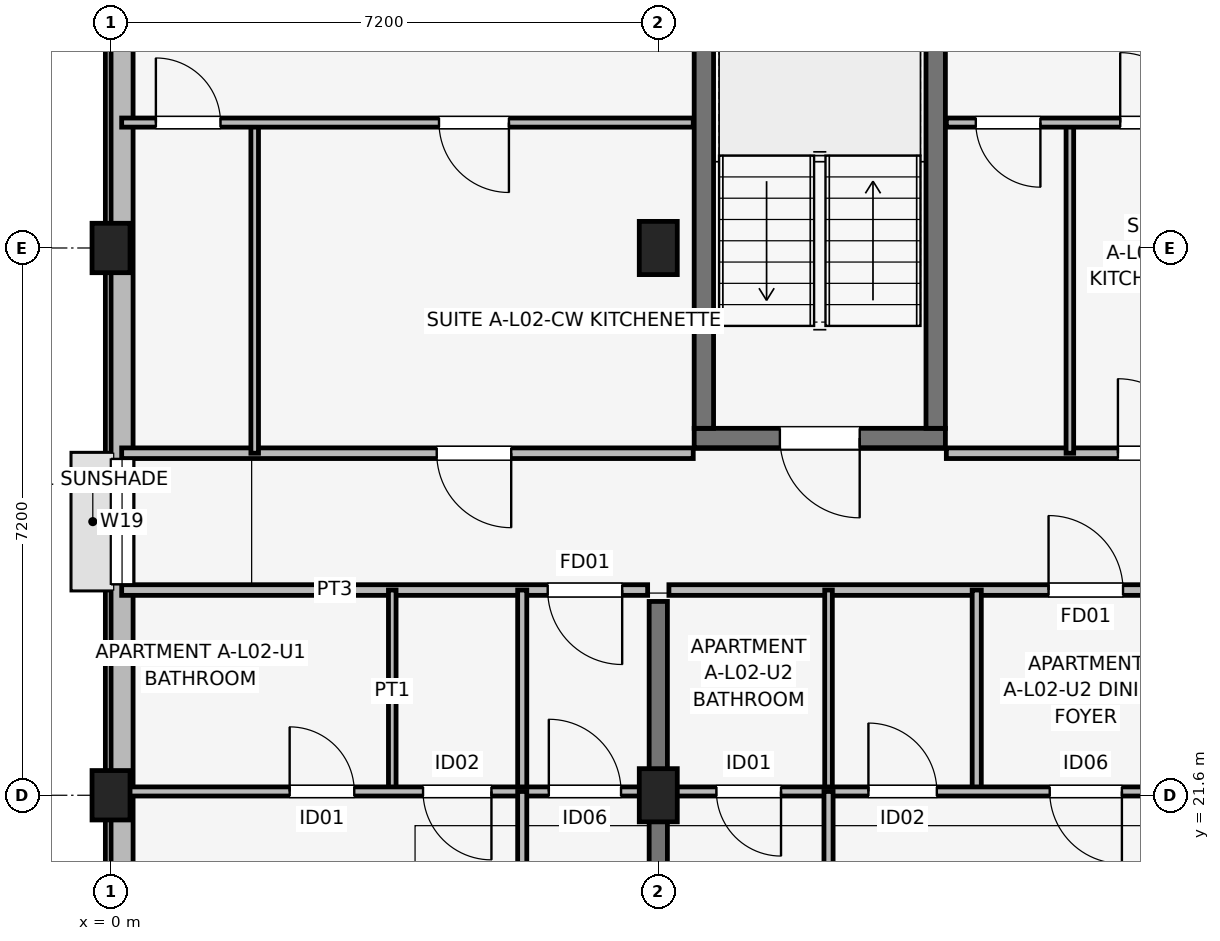
"""IFC4 building model, lengths in metres.
Left out: names, types, materials, properties, quantities, classifications, styles, units other than length and angle.
Written with IfcOpenShell. Run it as: python <this file> out.ifc"""

import sys

from ifc_helpers import new_model, si_unit, direction, frame, frame_2d, origin, origin_2d, place, context, subcontext, project, spatial, rectangle, extrude, element, fill, save


model = new_model("IFC4")
c1 = context("Model", 3, precision=1e-05, world=origin(), true_north=direction((0.0, 1.0)))
c2 = subcontext(c1, "Body", "Model", "MODEL_VIEW")
j1 = project(units=[si_unit("LENGTHUNIT", "METRE"), si_unit("PLANEANGLEUNIT", "RADIAN")], contexts=[c1])
p1 = place(None, origin())
s1 = spatial("IfcSite", under=j1, at=p1, CompositionType="ELEMENT")
p2 = place(p1, origin())
s2 = spatial("IfcBuilding", under=s1, at=p2, CompositionType="ELEMENT")
p3 = place(p2, frame((0.0, 0.0, 8.7)))
s3 = spatial("IfcBuildingStorey", under=s2, at=p3, CompositionType="ELEMENT", Elevation=8.7)
for number, where, z_axis, x_axis in (
    (1, (0.0, 21.6, 0.0), (0.0, 0.0, 1.0), (1.0, 0.0, 0.0)),
    (2, (0.0, 28.8, 0.0), (0.0, 0.0, 1.0), (1.0, 0.0, 0.0)),
):
    element("IfcColumn", number, at=place(p3, frame(where, z_axis=z_axis, x_axis=x_axis)), inside=s3, PredefinedType="COLUMN", context=c2, shape_type="SweptSolid", body=[
        extrude(rectangle(XDim=0.5, YDim=0.65, at=origin_2d()), origin(), (0.0, 0.0, 1.0), 3.15),
    ])
for number, where, z_axis, x_axis in (
    (3, (7.2, 21.6, 0.0), (0.0, 0.0, 1.0), (1.0, 0.0, 0.0)),
    (4, (7.2, 28.8, 0.0), (0.0, 0.0, 1.0), (1.0, 0.0, 0.0)),
):
    element("IfcColumn", number, at=place(p3, frame(where, z_axis=z_axis, x_axis=x_axis)), inside=s3, PredefinedType="COLUMN", context=c2, shape_type="SweptSolid", body=[
        extrude(rectangle(XDim=0.5, YDim=0.7, at=origin_2d()), origin(), (0.0, 0.0, 1.0), 3.15),
    ])
p4 = place(p3, frame((7.673, 26.3, 0.0), z_axis=(0.0, 0.0, 1.0), x_axis=(1.0, 0.0, 0.0)))
e5 = element("IfcWall", 5, at=p4, inside=s3, PredefinedType="SHEAR", context=c2, shape_type="SweptSolid", body=[
    extrude(rectangle(XDim=3.305, YDim=0.255, at=frame_2d((1.652, 0.0))), origin(), (0.0, 0.0, 1.0), 3.15),
])
p5 = place(p4, frame((2.177, 0.0, 0.0), z_axis=(0.0, 0.0, 1.0), x_axis=(-1.0, 0.0, 0.0)))
e6 = element("IfcOpeningElement", 6, at=p5, cuts=e5, PredefinedType="OPENING", context=c2, shape_type="SweptSolid", body=[
    extrude(rectangle(XDim=1.05, YDim=2.12, at=frame_2d((0.525, 1.06))), frame((0.0, 0.137, 0.0), z_axis=(0.0, -1.0, 0.0), x_axis=(1.0, 0.0, 0.0)), (0.0, 0.0, 1.0), 0.275),
])
for number, where, z_axis, x_axis in (
    (7, (7.8, 26.427, 0.0), (0.0, 0.0, 1.0), (0.0, 1.0, 0.0)),
    (8, (10.85, 26.427, 0.0), (0.0, 0.0, 1.0), (0.0, 1.0, 0.0)),
):
    element("IfcWall", number, at=place(p3, frame(where, z_axis=z_axis, x_axis=x_axis)), inside=s3, PredefinedType="SHEAR", context=c2, shape_type="SweptSolid", body=[
        extrude(rectangle(XDim=6.295, YDim=0.255, at=frame_2d((3.147, 0.0))), origin(), (0.0, 0.0, 1.0), 3.15),
    ])
p6 = place(p3, frame((7.2, 14.75, 0.0), z_axis=(0.0, 0.0, 1.0), x_axis=(0.0, 1.0, 0.0)))
e9 = element("IfcWall", 9, at=p6, inside=s3, PredefinedType="SHEAR", context=c2, shape_type="SweptSolid", body=[
    extrude(rectangle(XDim=9.4, YDim=0.24, at=frame_2d((4.7, 0.0))), origin(), (0.0, 0.0, 1.0), 3.15),
])
p7 = place(p3, frame((0.145, 32.6, 0.0), z_axis=(0.0, 0.0, 1.0), x_axis=(0.0, -1.0, 0.0)))
e10 = element("IfcWall", 10, at=p7, inside=s3, PredefinedType="SOLIDWALL", context=c2, shape_type="SweptSolid", body=[
    extrude(rectangle(XDim=14.8, YDim=0.29, at=frame_2d((7.4, 0.0))), origin(), (0.0, 0.0, 1.0), 2.38),
])
p8 = place(p7, frame((6.575, 0.0, 1.05)))
e11 = element("IfcOpeningElement", 11, at=p8, cuts=e10, PredefinedType="OPENING", context=c2, shape_type="SweptSolid", body=[
    extrude(rectangle(XDim=1.65, YDim=1.15, at=frame_2d((0.825, 0.575))), frame((0.0, 0.155, 0.0), z_axis=(0.0, -1.0, 0.0), x_axis=(1.0, 0.0, 0.0)), (0.0, 0.0, 1.0), 0.31),
])
p9 = place(p7, frame((12.327, 0.0, 0.72)))
e12 = element("IfcOpeningElement", 12, at=p9, cuts=e10, PredefinedType="OPENING", context=c2, shape_type="SweptSolid", body=[
    extrude(rectangle(XDim=1.3, YDim=1.55, at=frame_2d((0.65, 0.775))), frame((0.0, 0.155, 0.0), z_axis=(0.0, -1.0, 0.0), x_axis=(1.0, 0.0, 0.0)), (0.0, 0.0, 1.0), 0.31),
])
p10 = place(p3, frame((0.14, 24.3, 0.0), z_axis=(0.0, 0.0, 1.0), x_axis=(1.0, 0.0, 0.0)))
e13 = element("IfcWall", 13, at=p10, inside=s3, PredefinedType="PARTITIONING", context=c2, shape_type="SweptSolid", body=[
    extrude(rectangle(XDim=6.92, YDim=0.14, at=frame_2d((3.46, 0.0))), origin(), (0.0, 0.0, 1.0), 2.38),
])
p11 = place(p10, frame((6.585, 0.0, 0.0), z_axis=(0.0, 0.0, 1.0), x_axis=(-1.0, 0.0, 0.0)))
e14 = element("IfcOpeningElement", 14, at=p11, cuts=e13, PredefinedType="OPENING", context=c2, shape_type="SweptSolid", body=[
    extrude(rectangle(XDim=0.98, YDim=2.1, at=frame_2d((0.49, 1.05))), frame((0.0, 0.08, 0.0), z_axis=(0.0, -1.0, 0.0), x_axis=(1.0, 0.0, 0.0)), (0.0, 0.0, 1.0), 0.16),
])
p12 = place(p3, frame((3.7, 21.65, 0.0), z_axis=(0.0, 0.0, 1.0), x_axis=(0.0, 1.0, 0.0)))
e15 = element("IfcWall", 15, at=p12, inside=s3, PredefinedType="PARTITIONING", context=c2, shape_type="SweptSolid", body=[
    extrude(rectangle(XDim=2.65, YDim=0.1, at=frame_2d((1.325, 0.0))), origin(), (0.0, 0.0, 1.0), 2.375),
])
p13 = place(p3, frame((5.41, 21.65, 0.0), z_axis=(0.0, 0.0, 1.0), x_axis=(0.0, 1.0, 0.0)))
e16 = element("IfcWall", 16, at=p13, inside=s3, PredefinedType="PARTITIONING", context=c2, shape_type="SweptSolid", body=[
    extrude(rectangle(XDim=2.65, YDim=0.12, at=frame_2d((1.325, 0.0))), origin(), (0.0, 0.0, 1.0), 2.375),
])
p14 = place(p3, frame((0.14, 21.65, 0.0), z_axis=(0.0, 0.0, 1.0), x_axis=(1.0, 0.0, 0.0)))
e17 = element("IfcWall", 17, at=p14, inside=s3, PredefinedType="PARTITIONING", context=c2, shape_type="SweptSolid", body=[
    extrude(rectangle(XDim=6.92, YDim=0.12, at=frame_2d((3.46, 0.0))), origin(), (0.0, 0.0, 1.0), 2.375),
])
p15 = place(p14, frame((2.21, 0.0, 0.0)))
e18 = element("IfcOpeningElement", 18, at=p15, cuts=e17, PredefinedType="OPENING", context=c2, shape_type="SweptSolid", body=[
    extrude(rectangle(XDim=0.85, YDim=2.08, at=frame_2d((0.425, 1.04))), frame((0.0, 0.07, 0.0), z_axis=(0.0, -1.0, 0.0), x_axis=(1.0, 0.0, 0.0)), (0.0, 0.0, 1.0), 0.14),
])
p16 = place(p14, frame((4.865, 0.0, 0.0), z_axis=(0.0, 0.0, 1.0), x_axis=(-1.0, 0.0, 0.0)))
e19 = element("IfcOpeningElement", 19, at=p16, cuts=e17, PredefinedType="OPENING", context=c2, shape_type="SweptSolid", body=[
    extrude(rectangle(XDim=0.9, YDim=2.08, at=frame_2d((0.45, 1.04))), frame((0.0, 0.07, 0.0), z_axis=(0.0, -1.0, 0.0), x_axis=(1.0, 0.0, 0.0)), (0.0, 0.0, 1.0), 0.14),
])
p17 = place(p14, frame((5.62, 0.0, 0.0)))
e20 = element("IfcOpeningElement", 20, at=p17, cuts=e17, PredefinedType="OPENING", context=c2, shape_type="SweptSolid", body=[
    extrude(rectangle(XDim=0.95, YDim=2.08, at=frame_2d((0.475, 1.04))), frame((0.0, 0.07, 0.0), z_axis=(0.0, -1.0, 0.0), x_axis=(1.0, 0.0, 0.0)), (0.0, 0.0, 1.0), 0.14),
])
p18 = place(p3, frame((5.41, 14.7, 0.0), z_axis=(0.0, 0.0, 1.0), x_axis=(0.0, 1.0, 0.0)))
e21 = element("IfcWall", 21, at=p18, inside=s3, PredefinedType="PARTITIONING", context=c2, shape_type="SweptSolid", body=[
    extrude(rectangle(XDim=6.95, YDim=0.12, at=frame_2d((3.475, 0.0))), origin(), (0.0, 0.0, 1.0), 2.375),
])
p19 = place(p18, frame((3.925, 0.0, 0.0), z_axis=(0.0, 0.0, 1.0), x_axis=(-1.0, 0.0, 0.0)))
e22 = element("IfcOpeningElement", 22, at=p19, cuts=e21, PredefinedType="OPENING", context=c2, shape_type="SweptSolid", body=[
    extrude(rectangle(XDim=0.9, YDim=2.08, at=frame_2d((0.45, 1.04))), frame((0.0, 0.07, 0.0), z_axis=(0.0, -1.0, 0.0), x_axis=(1.0, 0.0, 0.0)), (0.0, 0.0, 1.0), 0.14),
])
p20 = place(p3, frame((7.34, 24.3, 0.0), z_axis=(0.0, 0.0, 1.0), x_axis=(1.0, 0.0, 0.0)))
e23 = element("IfcWall", 23, at=p20, inside=s3, PredefinedType="PARTITIONING", context=c2, shape_type="SweptSolid", body=[
    extrude(rectangle(XDim=6.92, YDim=0.14, at=frame_2d((3.46, 0.0))), origin(), (0.0, 0.0, 1.0), 2.38),
])
p21 = place(p20, frame((4.995, 0.0, 0.0)))
e24 = element("IfcOpeningElement", 24, at=p21, cuts=e23, PredefinedType="OPENING", context=c2, shape_type="SweptSolid", body=[
    extrude(rectangle(XDim=0.98, YDim=2.1, at=frame_2d((0.49, 1.05))), frame((0.0, 0.08, 0.0), z_axis=(0.0, -1.0, 0.0), x_axis=(1.0, 0.0, 0.0)), (0.0, 0.0, 1.0), 0.16),
])
p22 = place(p3, frame((9.44, 21.65, 0.0), z_axis=(0.0, 0.0, 1.0), x_axis=(0.0, 1.0, 0.0)))
e25 = element("IfcWall", 25, at=p22, inside=s3, PredefinedType="PARTITIONING", context=c2, shape_type="SweptSolid", body=[
    extrude(rectangle(XDim=2.65, YDim=0.1, at=frame_2d((1.325, 0.0))), origin(), (0.0, 0.0, 1.0), 2.375),
])
p23 = place(p3, frame((11.39, 21.65, 0.0), z_axis=(0.0, 0.0, 1.0), x_axis=(0.0, 1.0, 0.0)))
e26 = element("IfcWall", 26, at=p23, inside=s3, PredefinedType="PARTITIONING", context=c2, shape_type="SweptSolid", body=[
    extrude(rectangle(XDim=2.65, YDim=0.12, at=frame_2d((1.325, 0.0))), origin(), (0.0, 0.0, 1.0), 2.375),
])
p24 = place(p3, frame((7.34, 21.65, 0.0), z_axis=(0.0, 0.0, 1.0), x_axis=(1.0, 0.0, 0.0)))
e27 = element("IfcWall", 27, at=p24, inside=s3, PredefinedType="PARTITIONING", context=c2, shape_type="SweptSolid", body=[
    extrude(rectangle(XDim=6.92, YDim=0.12, at=frame_2d((3.46, 0.0))), origin(), (0.0, 0.0, 1.0), 2.375),
])
p25 = place(p24, frame((1.475, 0.0, 0.0), z_axis=(0.0, 0.0, 1.0), x_axis=(-1.0, 0.0, 0.0)))
e28 = element("IfcOpeningElement", 28, at=p25, cuts=e27, PredefinedType="OPENING", context=c2, shape_type="SweptSolid", body=[
    extrude(rectangle(XDim=0.85, YDim=2.08, at=frame_2d((0.425, 1.04))), frame((0.0, 0.07, 0.0), z_axis=(0.0, -1.0, 0.0), x_axis=(1.0, 0.0, 0.0)), (0.0, 0.0, 1.0), 0.14),
])
p26 = place(p24, frame((2.625, 0.0, 0.0)))
e29 = element("IfcOpeningElement", 29, at=p26, cuts=e27, PredefinedType="OPENING", context=c2, shape_type="SweptSolid", body=[
    extrude(rectangle(XDim=0.9, YDim=2.08, at=frame_2d((0.45, 1.04))), frame((0.0, 0.07, 0.0), z_axis=(0.0, -1.0, 0.0), x_axis=(1.0, 0.0, 0.0)), (0.0, 0.0, 1.0), 0.14),
])
p27 = place(p24, frame((5.96, 0.0, 0.0), z_axis=(0.0, 0.0, 1.0), x_axis=(-1.0, 0.0, 0.0)))
e30 = element("IfcOpeningElement", 30, at=p27, cuts=e27, PredefinedType="OPENING", context=c2, shape_type="SweptSolid", body=[
    extrude(rectangle(XDim=0.95, YDim=2.08, at=frame_2d((0.475, 1.04))), frame((0.0, 0.07, 0.0), z_axis=(0.0, -1.0, 0.0), x_axis=(1.0, 0.0, 0.0)), (0.0, 0.0, 1.0), 0.14),
])
p28 = place(p3, frame((9.44, 14.7, 0.0), z_axis=(0.0, 0.0, 1.0), x_axis=(0.0, 1.0, 0.0)))
e31 = element("IfcWall", 31, at=p28, inside=s3, PredefinedType="PARTITIONING", context=c2, shape_type="SweptSolid", body=[
    extrude(rectangle(XDim=6.95, YDim=0.12, at=frame_2d((3.475, 0.0))), origin(), (0.0, 0.0, 1.0), 2.375),
])
p29 = place(p28, frame((3.025, 0.0, 0.0)))
e32 = element("IfcOpeningElement", 32, at=p29, cuts=e31, PredefinedType="OPENING", context=c2, shape_type="SweptSolid", body=[
    extrude(rectangle(XDim=0.9, YDim=2.08, at=frame_2d((0.45, 1.04))), frame((0.0, 0.07, 0.0), z_axis=(0.0, -1.0, 0.0), x_axis=(1.0, 0.0, 0.0)), (0.0, 0.0, 1.0), 0.14),
])
p30 = place(p3, frame((0.14, 26.1, 0.0), z_axis=(0.0, 0.0, 1.0), x_axis=(1.0, 0.0, 0.0)))
e33 = element("IfcWall", 33, at=p30, inside=s3, PredefinedType="PARTITIONING", context=c2, shape_type="SweptSolid", body=[
    extrude(rectangle(XDim=7.52, YDim=0.14, at=frame_2d((3.76, 0.0))), origin(), (0.0, 0.0, 1.0), 2.38),
])
p31 = place(p30, frame((5.125, 0.0, 0.0), z_axis=(0.0, 0.0, 1.0), x_axis=(-1.0, 0.0, 0.0)))
e34 = element("IfcOpeningElement", 34, at=p31, cuts=e33, PredefinedType="OPENING", context=c2, shape_type="SweptSolid", body=[
    extrude(rectangle(XDim=0.98, YDim=2.1, at=frame_2d((0.49, 1.05))), frame((0.0, 0.08, 0.0), z_axis=(0.0, -1.0, 0.0), x_axis=(1.0, 0.0, 0.0)), (0.0, 0.0, 1.0), 0.16),
])
p32 = place(p3, frame((1.89, 26.1, 0.0), z_axis=(0.0, 0.0, 1.0), x_axis=(0.0, 1.0, 0.0)))
e35 = element("IfcWall", 35, at=p32, inside=s3, PredefinedType="PARTITIONING", context=c2, shape_type="SweptSolid", body=[
    extrude(rectangle(XDim=4.35, YDim=0.1, at=frame_2d((2.175, 0.0))), origin(), (0.0, 0.0, 1.0), 2.375),
])
p33 = place(p3, frame((0.14, 30.45, 0.0), z_axis=(0.0, 0.0, 1.0), x_axis=(1.0, 0.0, 0.0)))
e36 = element("IfcWall", 36, at=p33, inside=s3, PredefinedType="PARTITIONING", context=c2, shape_type="SweptSolid", body=[
    extrude(rectangle(XDim=7.52, YDim=0.12, at=frame_2d((3.76, 0.0))), origin(), (0.0, 0.0, 1.0), 2.38),
])
p34 = place(p33, frame((0.45, 0.0, 0.0)))
e37 = element("IfcOpeningElement", 37, at=p34, cuts=e36, PredefinedType="OPENING", context=c2, shape_type="SweptSolid", body=[
    extrude(rectangle(XDim=0.85, YDim=2.08, at=frame_2d((0.425, 1.04))), frame((0.0, 0.07, 0.0), z_axis=(0.0, -1.0, 0.0), x_axis=(1.0, 0.0, 0.0)), (0.0, 0.0, 1.0), 0.14),
])
p35 = place(p33, frame((5.095, 0.0, 0.0), z_axis=(0.0, 0.0, 1.0), x_axis=(-1.0, 0.0, 0.0)))
e38 = element("IfcOpeningElement", 38, at=p35, cuts=e36, PredefinedType="OPENING", context=c2, shape_type="SweptSolid", body=[
    extrude(rectangle(XDim=0.92, YDim=2.08, at=frame_2d((0.46, 1.04))), frame((0.0, 0.07, 0.0), z_axis=(0.0, -1.0, 0.0), x_axis=(1.0, 0.0, 0.0)), (0.0, 0.0, 1.0), 0.14),
])
p36 = place(p3, frame((10.99, 26.1, 0.0), z_axis=(0.0, 0.0, 1.0), x_axis=(1.0, 0.0, 0.0)))
e39 = element("IfcWall", 39, at=p36, inside=s3, PredefinedType="PARTITIONING", context=c2, shape_type="SweptSolid", body=[
    extrude(rectangle(XDim=3.87, YDim=0.14, at=frame_2d((1.935, 0.0))), origin(), (0.0, 0.0, 1.0), 2.38),
])
p37 = place(p36, frame((2.258, 0.0, 0.0)))
e40 = element("IfcOpeningElement", 40, at=p37, cuts=e39, PredefinedType="OPENING", context=c2, shape_type="SweptSolid", body=[
    extrude(rectangle(XDim=0.98, YDim=2.1, at=frame_2d((0.49, 1.05))), frame((0.0, 0.08, 0.0), z_axis=(0.0, -1.0, 0.0), x_axis=(1.0, 0.0, 0.0)), (0.0, 0.0, 1.0), 0.16),
])
p38 = place(p3, frame((12.615, 26.1, 0.0), z_axis=(0.0, 0.0, 1.0), x_axis=(0.0, 1.0, 0.0)))
e41 = element("IfcWall", 41, at=p38, inside=s3, PredefinedType="PARTITIONING", context=c2, shape_type="SweptSolid", body=[
    extrude(rectangle(XDim=4.35, YDim=0.1, at=frame_2d((2.175, 0.0))), origin(), (0.0, 0.0, 1.0), 2.375),
])
p39 = place(p3, frame((10.99, 30.45, 0.0), z_axis=(0.0, 0.0, 1.0), x_axis=(1.0, 0.0, 0.0)))
e42 = element("IfcWall", 42, at=p39, inside=s3, PredefinedType="PARTITIONING", context=c2, shape_type="SweptSolid", body=[
    extrude(rectangle(XDim=3.87, YDim=0.12, at=frame_2d((1.935, 0.0))), origin(), (0.0, 0.0, 1.0), 2.38),
])
p40 = place(p39, frame((1.238, 0.0, 0.0), z_axis=(0.0, 0.0, 1.0), x_axis=(-1.0, 0.0, 0.0)))
e43 = element("IfcOpeningElement", 43, at=p40, cuts=e42, PredefinedType="OPENING", context=c2, shape_type="SweptSolid", body=[
    extrude(rectangle(XDim=0.85, YDim=2.08, at=frame_2d((0.425, 1.04))), frame((0.0, 0.07, 0.0), z_axis=(0.0, -1.0, 0.0), x_axis=(1.0, 0.0, 0.0)), (0.0, 0.0, 1.0), 0.14),
])
p41 = place(p39, frame((2.288, 0.0, 0.0)))
e44 = element("IfcOpeningElement", 44, at=p41, cuts=e42, PredefinedType="OPENING", context=c2, shape_type="SweptSolid", body=[
    extrude(rectangle(XDim=0.92, YDim=2.08, at=frame_2d((0.46, 1.04))), frame((0.0, 0.07, 0.0), z_axis=(0.0, -1.0, 0.0), x_axis=(1.0, 0.0, 0.0)), (0.0, 0.0, 1.0), 0.14),
])
p42 = place(p8, origin())
e45 = element("IfcWindow", 45, at=p42, inside=s3, PartitioningType="SINGLE_PANEL", PredefinedType="WINDOW", context=c2, shape_type="SweptSolid", body=[
    extrude(rectangle(XDim=1.65, YDim=1.15, at=frame_2d((0.825, 0.575))), frame((0.0, 0.03, 0.0), z_axis=(0.0, -1.0, 0.0), x_axis=(1.0, 0.0, 0.0)), (0.0, 0.0, 1.0), 0.06),
])
fill(e11, e45)
p43 = place(p11, origin())
e46 = element("IfcDoor", 46, at=p43, inside=s3, OperationType="SINGLE_SWING_RIGHT", PredefinedType="DOOR", context=c2, shape_type="SweptSolid", body=[
    extrude(rectangle(XDim=0.98, YDim=2.1, at=frame_2d((0.49, 1.05))), frame((0.0, 0.025, 0.0), z_axis=(0.0, -1.0, 0.0), x_axis=(1.0, 0.0, 0.0)), (0.0, 0.0, 1.0), 0.05),
])
fill(e14, e46)
p44 = place(p15, origin())
e47 = element("IfcDoor", 47, at=p44, inside=s3, OperationType="SINGLE_SWING_LEFT", PredefinedType="DOOR", context=c2, shape_type="SweptSolid", body=[
    extrude(rectangle(XDim=0.85, YDim=2.08, at=frame_2d((0.425, 1.04))), frame((0.0, 0.025, 0.0), z_axis=(0.0, -1.0, 0.0), x_axis=(1.0, 0.0, 0.0)), (0.0, 0.0, 1.0), 0.05),
])
fill(e18, e47)
p45 = place(p16, origin())
e48 = element("IfcDoor", 48, at=p45, inside=s3, OperationType="SINGLE_SWING_RIGHT", PredefinedType="DOOR", context=c2, shape_type="SweptSolid", body=[
    extrude(rectangle(XDim=0.9, YDim=2.08, at=frame_2d((0.45, 1.04))), frame((0.0, 0.025, 0.0), z_axis=(0.0, -1.0, 0.0), x_axis=(1.0, 0.0, 0.0)), (0.0, 0.0, 1.0), 0.05),
])
fill(e19, e48)
p46 = place(p17, origin())
e49 = element("IfcDoor", 49, at=p46, inside=s3, OperationType="SINGLE_SWING_LEFT", PredefinedType="DOOR", context=c2, shape_type="SweptSolid", body=[
    extrude(rectangle(XDim=0.95, YDim=2.08, at=frame_2d((0.475, 1.04))), frame((0.0, 0.025, 0.0), z_axis=(0.0, -1.0, 0.0), x_axis=(1.0, 0.0, 0.0)), (0.0, 0.0, 1.0), 0.05),
])
fill(e20, e49)
p47 = place(p21, origin())
e50 = element("IfcDoor", 50, at=p47, inside=s3, OperationType="SINGLE_SWING_LEFT", PredefinedType="DOOR", context=c2, shape_type="SweptSolid", body=[
    extrude(rectangle(XDim=0.98, YDim=2.1, at=frame_2d((0.49, 1.05))), frame((0.0, 0.025, 0.0), z_axis=(0.0, -1.0, 0.0), x_axis=(1.0, 0.0, 0.0)), (0.0, 0.0, 1.0), 0.05),
])
fill(e24, e50)
p48 = place(p25, origin())
e51 = element("IfcDoor", 51, at=p48, inside=s3, OperationType="SINGLE_SWING_RIGHT", PredefinedType="DOOR", context=c2, shape_type="SweptSolid", body=[
    extrude(rectangle(XDim=0.85, YDim=2.08, at=frame_2d((0.425, 1.04))), frame((0.0, 0.025, 0.0), z_axis=(0.0, -1.0, 0.0), x_axis=(1.0, 0.0, 0.0)), (0.0, 0.0, 1.0), 0.05),
])
fill(e28, e51)
p49 = place(p26, origin())
e52 = element("IfcDoor", 52, at=p49, inside=s3, OperationType="SINGLE_SWING_LEFT", PredefinedType="DOOR", context=c2, shape_type="SweptSolid", body=[
    extrude(rectangle(XDim=0.9, YDim=2.08, at=frame_2d((0.45, 1.04))), frame((0.0, 0.025, 0.0), z_axis=(0.0, -1.0, 0.0), x_axis=(1.0, 0.0, 0.0)), (0.0, 0.0, 1.0), 0.05),
])
fill(e29, e52)
p50 = place(p27, origin())
e53 = element("IfcDoor", 53, at=p50, inside=s3, OperationType="SINGLE_SWING_RIGHT", PredefinedType="DOOR", context=c2, shape_type="SweptSolid", body=[
    extrude(rectangle(XDim=0.95, YDim=2.08, at=frame_2d((0.475, 1.04))), frame((0.0, 0.025, 0.0), z_axis=(0.0, -1.0, 0.0), x_axis=(1.0, 0.0, 0.0)), (0.0, 0.0, 1.0), 0.05),
])
fill(e30, e53)
p51 = place(p31, origin())
e54 = element("IfcDoor", 54, at=p51, inside=s3, OperationType="SINGLE_SWING_RIGHT", PredefinedType="DOOR", context=c2, shape_type="SweptSolid", body=[
    extrude(rectangle(XDim=0.98, YDim=2.1, at=frame_2d((0.49, 1.05))), frame((0.0, 0.025, 0.0), z_axis=(0.0, -1.0, 0.0), x_axis=(1.0, 0.0, 0.0)), (0.0, 0.0, 1.0), 0.05),
])
fill(e34, e54)
p52 = place(p34, origin())
e55 = element("IfcDoor", 55, at=p52, inside=s3, OperationType="SINGLE_SWING_LEFT", PredefinedType="DOOR", context=c2, shape_type="SweptSolid", body=[
    extrude(rectangle(XDim=0.85, YDim=2.08, at=frame_2d((0.425, 1.04))), frame((0.0, 0.025, 0.0), z_axis=(0.0, -1.0, 0.0), x_axis=(1.0, 0.0, 0.0)), (0.0, 0.0, 1.0), 0.05),
])
fill(e37, e55)
p53 = place(p35, origin())
e56 = element("IfcDoor", 56, at=p53, inside=s3, OperationType="SINGLE_SWING_RIGHT", PredefinedType="DOOR", context=c2, shape_type="SweptSolid", body=[
    extrude(rectangle(XDim=0.92, YDim=2.08, at=frame_2d((0.46, 1.04))), frame((0.0, 0.025, 0.0), z_axis=(0.0, -1.0, 0.0), x_axis=(1.0, 0.0, 0.0)), (0.0, 0.0, 1.0), 0.05),
])
fill(e38, e56)
p54 = place(p37, origin())
e57 = element("IfcDoor", 57, at=p54, inside=s3, OperationType="SINGLE_SWING_LEFT", PredefinedType="DOOR", context=c2, shape_type="SweptSolid", body=[
    extrude(rectangle(XDim=0.98, YDim=2.1, at=frame_2d((0.49, 1.05))), frame((0.0, 0.025, 0.0), z_axis=(0.0, -1.0, 0.0), x_axis=(1.0, 0.0, 0.0)), (0.0, 0.0, 1.0), 0.05),
])
fill(e40, e57)
p55 = place(p40, origin())
e58 = element("IfcDoor", 58, at=p55, inside=s3, OperationType="SINGLE_SWING_RIGHT", PredefinedType="DOOR", context=c2, shape_type="SweptSolid", body=[
    extrude(rectangle(XDim=0.85, YDim=2.08, at=frame_2d((0.425, 1.04))), frame((0.0, 0.025, 0.0), z_axis=(0.0, -1.0, 0.0), x_axis=(1.0, 0.0, 0.0)), (0.0, 0.0, 1.0), 0.05),
])
fill(e43, e58)
p56 = place(p41, origin())
e59 = element("IfcDoor", 59, at=p56, inside=s3, OperationType="SINGLE_SWING_LEFT", PredefinedType="DOOR", context=c2, shape_type="SweptSolid", body=[
    extrude(rectangle(XDim=0.92, YDim=2.08, at=frame_2d((0.46, 1.04))), frame((0.0, 0.025, 0.0), z_axis=(0.0, -1.0, 0.0), x_axis=(1.0, 0.0, 0.0)), (0.0, 0.0, 1.0), 0.05),
])
fill(e44, e59)
p57 = place(p5, origin())
e60 = element("IfcDoor", 60, at=p57, inside=s3, OperationType="SINGLE_SWING_RIGHT", PredefinedType="DOOR", context=c2, shape_type="SweptSolid", body=[
    extrude(rectangle(XDim=1.05, YDim=2.12, at=frame_2d((0.525, 1.06))), frame((0.0, 0.025, 0.0), z_axis=(0.0, -1.0, 0.0), x_axis=(1.0, 0.0, 0.0)), (0.0, 0.0, 1.0), 0.05),
])
fill(e6, e60)
save(model, sys.argv[1])
